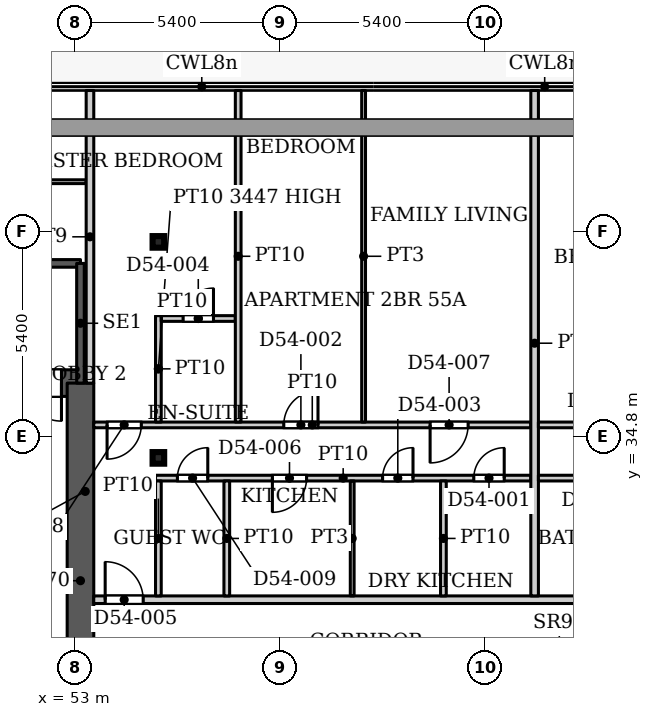
"""IFC4 building model, lengths in metres.
Left out: names, types, materials, properties, quantities, classifications, styles, units other than length and angle.
Written with IfcOpenShell. Run it as: python <this file> out.ifc"""

import sys

from ifc_helpers import new_model, si_unit, direction, frame, frame_2d, origin, origin_2d, place, context, subcontext, project, spatial, rectangle, hollow_rectangle, extrude, source, transform, mapped, element, fill, save


model = new_model("IFC4")
c1 = context("Model", 3, precision=1e-05, world=origin(), true_north=direction((0.0, 1.0)))
c2 = subcontext(c1, "Body", "Model", "MODEL_VIEW")
j1 = project(units=[si_unit("LENGTHUNIT", "METRE"), si_unit("PLANEANGLEUNIT", "RADIAN")], contexts=[c1])
p1 = place(None, origin())
s1 = spatial("IfcSite", under=j1, at=p1, CompositionType="ELEMENT")
p2 = place(p1, origin())
s2 = spatial("IfcBuilding", under=s1, at=p2, CompositionType="ELEMENT")
p3 = place(p2, frame((0.0, 0.0, 235.7)))
s3 = spatial("IfcBuildingStorey", under=s2, at=p3, CompositionType="ELEMENT", Elevation=235.7)
for number, where, z_axis, x_axis in (
    (1, (55.2, 34.232, 0.0), (0.0, 0.0, 1.0), (1.0, 0.0, 0.0)),
    (2, (55.2, 39.916, 0.0), (0.0, 0.0, 1.0), (1.0, 0.0, 0.0)),
):
    element("IfcColumn", number, at=place(p3, frame(where, z_axis=z_axis, x_axis=x_axis)), inside=s3, PredefinedType="COLUMN", context=c2, shape_type="SweptSolid", body=[
        extrude(hollow_rectangle(XDim=0.305, YDim=0.305, WallThickness=0.016, InnerFilletRadius=0.016, OuterFilletRadius=0.032, at=origin_2d()), origin(), (0.0, 0.0, 1.0), 3.9),
    ])
p4 = place(p3, frame((34.75, 36.2, 0.0), z_axis=(0.0, 0.0, 1.0), x_axis=(1.0, 0.0, 0.0)))
e3 = element("IfcWall", 3, at=p4, inside=s3, PredefinedType="SHEAR", context=c2, shape_type="SweptSolid", body=[
    extrude(rectangle(XDim=18.4, YDim=0.7, at=frame_2d((9.2, 0.0))), origin(), (0.0, 0.0, 1.0), 3.9),
])
p5 = place(p4, frame((16.9, 0.0, 0.0)))
e4 = element("IfcOpeningElement", 4, at=p5, cuts=e3, PredefinedType="OPENING", context=c2, shape_type="SweptSolid", body=[
    extrude(rectangle(XDim=1.0, YDim=2.2, at=frame_2d((0.5, 1.1))), frame((0.0, 0.36, 0.0), z_axis=(0.0, -1.0, 0.0), x_axis=(1.0, 0.0, 0.0)), (0.0, 0.0, 1.0), 0.72),
])
p6 = place(p3, frame((53.15, 25.8, 0.0), z_axis=(0.0, 0.0, 1.0), x_axis=(0.0, 1.0, 0.0)))
e5 = element("IfcWall", 5, at=p6, inside=s3, PredefinedType="SHEAR", context=c2, shape_type="SweptSolid", body=[
    extrude(rectangle(XDim=10.4, YDim=0.7, at=frame_2d((5.2, 0.0))), origin(), (0.0, 0.0, 1.0), 3.9),
])
p7 = place(p3, frame((43.99, 39.35, 0.0), z_axis=(0.0, 0.0, 1.0), x_axis=(1.0, 0.0, 0.0)))
e6 = element("IfcWall", 6, at=p7, inside=s3, PredefinedType="SHEAR", context=c2, shape_type="SweptSolid", body=[
    extrude(rectangle(XDim=9.16, YDim=0.2, at=frame_2d((4.58, 0.0))), origin(), (0.0, 0.0, 1.0), 3.9),
])
p8 = place(p3, frame((53.15, 36.2, 0.0), z_axis=(0.0, 0.0, 1.0), x_axis=(0.0, 1.0, 0.0)))
e7 = element("IfcWall", 7, at=p8, inside=s3, PredefinedType="SHEAR", context=c2, shape_type="SweptSolid", body=[
    extrude(rectangle(XDim=3.15, YDim=0.2, at=frame_2d((1.575, 0.0))), origin(), (0.0, 0.0, 1.0), 3.9),
])
p9 = place(p3, frame((38.349, 41.5, 0.0), z_axis=(0.0, 0.0, 1.0), x_axis=(1.0, 0.0, 0.0)))
e8 = element("IfcWall", 8, at=p9, inside=s3, PredefinedType="PARTITIONING", context=c2, shape_type="SweptSolid", body=[
    extrude(rectangle(XDim=14.951, YDim=0.1, at=frame_2d((7.476, 0.0))), origin(), (0.0, 0.0, 1.0), 3.6),
])
p10 = place(p9, frame((6.851, 0.0, 0.0)))
e9 = element("IfcOpeningElement", 9, at=p10, cuts=e8, PredefinedType="OPENING", context=c2, shape_type="SweptSolid", body=[
    extrude(rectangle(XDim=1.0, YDim=2.1, at=frame_2d((0.5, 1.05))), frame((0.0, 0.06, 0.0), z_axis=(0.0, -1.0, 0.0), x_axis=(1.0, 0.0, 0.0)), (0.0, 0.0, 1.0), 0.12),
])
p11 = place(p3, frame((53.4, 36.199, 0.0), z_axis=(0.0, 0.0, 1.0), x_axis=(0.0, 1.0, 0.0)))
e10 = element("IfcWall", 10, at=p11, inside=s3, PredefinedType="PARTITIONING", context=c2, shape_type="SweptSolid", body=[
    extrude(rectangle(XDim=7.701, YDim=0.2, at=frame_2d((3.851, 0.0))), origin(), (0.0, 0.0, 1.0), 3.6),
])
p12 = place(p3, frame((53.499, 30.5, 0.0), z_axis=(0.0, 0.0, 1.0), x_axis=(1.0, 0.0, 0.0)))
e11 = element("IfcWall", 11, at=p12, inside=s3, PredefinedType="PARTITIONING", context=c2, shape_type="SweptSolid", body=[
    extrude(rectangle(XDim=28.401, YDim=0.2, at=frame_2d((14.2, 0.0))), origin(), (0.0, 0.0, 1.0), 3.6),
])
p13 = place(p12, frame((0.301, 0.0, 0.0)))
e12 = element("IfcOpeningElement", 12, at=p13, cuts=e11, PredefinedType="OPENING", context=c2, shape_type="SweptSolid", body=[
    extrude(rectangle(XDim=1.0, YDim=2.1, at=frame_2d((0.5, 1.05))), frame((0.0, 0.11, 0.0), z_axis=(0.0, -1.0, 0.0), x_axis=(1.0, 0.0, 0.0)), (0.0, 0.0, 1.0), 0.22),
])
p14 = place(p12, frame((18.151, 0.0, 0.0)))
e13 = element("IfcOpeningElement", 13, at=p14, cuts=e11, PredefinedType="OPENING", context=c2, shape_type="SweptSolid", body=[
    extrude(rectangle(XDim=1.0, YDim=2.1, at=frame_2d((0.5, 1.05))), frame((0.0, 0.11, 0.0), z_axis=(0.0, -1.0, 0.0), x_axis=(1.0, 0.0, 0.0)), (0.0, 0.0, 1.0), 0.22),
])
p15 = place(p12, frame((25.801, 0.0, 0.0)))
e14 = element("IfcOpeningElement", 14, at=p15, cuts=e11, PredefinedType="OPENING", context=c2, shape_type="SweptSolid", body=[
    extrude(rectangle(XDim=1.0, YDim=2.1, at=frame_2d((0.5, 1.05))), frame((0.0, 0.11, 0.0), z_axis=(0.0, -1.0, 0.0), x_axis=(1.0, 0.0, 0.0)), (0.0, 0.0, 1.0), 0.22),
])
p16 = place(p3, frame((53.499, 35.1, 0.0), z_axis=(0.0, 0.0, 1.0), x_axis=(1.0, 0.0, 0.0)))
e15 = element("IfcWall", 15, at=p16, inside=s3, PredefinedType="PARTITIONING", context=c2, shape_type="SweptSolid", body=[
    extrude(rectangle(XDim=11.501, YDim=0.15, at=frame_2d((5.75, 0.0))), origin(), (0.0, 0.0, 1.0), 3.6),
])
p17 = place(p16, frame((5.001, 0.0, 0.0)))
e16 = element("IfcOpeningElement", 16, at=p17, cuts=e15, PredefinedType="OPENING", context=c2, shape_type="SweptSolid", body=[
    extrude(rectangle(XDim=0.9, YDim=2.1, at=frame_2d((0.45, 1.05))), frame((0.0, 0.085, 0.0), z_axis=(0.0, -1.0, 0.0), x_axis=(1.0, 0.0, 0.0)), (0.0, 0.0, 1.0), 0.17),
])
p18 = place(p16, frame((8.851, 0.0, 0.0)))
e17 = element("IfcOpeningElement", 17, at=p18, cuts=e15, PredefinedType="OPENING", context=c2, shape_type="SweptSolid", body=[
    extrude(rectangle(XDim=1.0, YDim=2.1, at=frame_2d((0.5, 1.05))), frame((0.0, 0.085, 0.0), z_axis=(0.0, -1.0, 0.0), x_axis=(1.0, 0.0, 0.0)), (0.0, 0.0, 1.0), 0.17),
])
p19 = place(p16, frame((0.351, 0.0, 0.0)))
e18 = element("IfcOpeningElement", 18, at=p19, cuts=e15, PredefinedType="OPENING", context=c2, shape_type="SweptSolid", body=[
    extrude(rectangle(XDim=0.9, YDim=2.1, at=frame_2d((0.45, 1.05))), frame((0.0, 0.085, 0.0), z_axis=(0.0, -1.0, 0.0), x_axis=(1.0, 0.0, 0.0)), (0.0, 0.0, 1.0), 0.17),
])
p20 = place(p3, frame((55.125, 33.7, 0.0), z_axis=(0.0, 0.0, 1.0), x_axis=(1.0, 0.0, 0.0)))
e19 = element("IfcWall", 19, at=p20, inside=s3, PredefinedType="PARTITIONING", context=c2, shape_type="SweptSolid", body=[
    extrude(rectangle(XDim=9.875, YDim=0.15, at=frame_2d((4.938, 0.0))), origin(), (0.0, 0.0, 1.0), 3.6),
])
p21 = place(p20, frame((8.375, 0.0, 0.0)))
e20 = element("IfcOpeningElement", 20, at=p21, cuts=e19, PredefinedType="OPENING", context=c2, shape_type="SweptSolid", body=[
    extrude(rectangle(XDim=0.8, YDim=2.1, at=frame_2d((0.4, 1.05))), frame((0.0, 0.085, 0.0), z_axis=(0.0, -1.0, 0.0), x_axis=(1.0, 0.0, 0.0)), (0.0, 0.0, 1.0), 0.17),
])
p22 = place(p20, frame((5.975, 0.0, 0.0)))
e21 = element("IfcOpeningElement", 21, at=p22, cuts=e19, PredefinedType="OPENING", context=c2, shape_type="SweptSolid", body=[
    extrude(rectangle(XDim=0.8, YDim=2.1, at=frame_2d((0.4, 1.05))), frame((0.0, 0.085, 0.0), z_axis=(0.0, -1.0, 0.0), x_axis=(1.0, 0.0, 0.0)), (0.0, 0.0, 1.0), 0.17),
])
p23 = place(p20, frame((3.075, 0.0, 0.0)))
e22 = element("IfcOpeningElement", 22, at=p23, cuts=e19, PredefinedType="OPENING", context=c2, shape_type="SweptSolid", body=[
    extrude(rectangle(XDim=0.9, YDim=2.1, at=frame_2d((0.45, 1.05))), frame((0.0, 0.085, 0.0), z_axis=(0.0, -1.0, 0.0), x_axis=(1.0, 0.0, 0.0)), (0.0, 0.0, 1.0), 0.17),
])
p24 = place(p20, frame((0.575, 0.0, 0.0)))
e23 = element("IfcOpeningElement", 23, at=p24, cuts=e19, PredefinedType="OPENING", context=c2, shape_type="SweptSolid", body=[
    extrude(rectangle(XDim=0.8, YDim=2.1, at=frame_2d((0.4, 1.05))), frame((0.0, 0.085, 0.0), z_axis=(0.0, -1.0, 0.0), x_axis=(1.0, 0.0, 0.0)), (0.0, 0.0, 1.0), 0.17),
])
p25 = place(p3, frame((55.2, 30.6, 0.0), z_axis=(0.0, 0.0, 1.0), x_axis=(0.0, 1.0, 0.0)))
e24 = element("IfcWall", 24, at=p25, inside=s3, PredefinedType="PARTITIONING", context=c2, shape_type="SweptSolid", body=[
    extrude(rectangle(XDim=3.025, YDim=0.15, at=frame_2d((1.512, 0.0))), origin(), (0.0, 0.0, 1.0), 3.6),
])
p26 = place(p3, frame((55.2, 35.175, 0.0), z_axis=(0.0, 0.0, 1.0), x_axis=(0.0, 1.0, 0.0)))
e25 = element("IfcWall", 25, at=p26, inside=s3, PredefinedType="PARTITIONING", context=c2, shape_type="SweptSolid", body=[
    extrude(rectangle(XDim=2.8, YDim=0.15, at=frame_2d((1.4, 0.0))), origin(), (0.0, 0.0, 1.0), 3.447),
])
p27 = place(p3, frame((55.275, 37.9, 0.0), z_axis=(0.0, 0.0, 1.0), x_axis=(1.0, 0.0, 0.0)))
e26 = element("IfcWall", 26, at=p27, inside=s3, PredefinedType="PARTITIONING", context=c2, shape_type="SweptSolid", body=[
    extrude(rectangle(XDim=1.95, YDim=0.15, at=frame_2d((0.975, 0.0))), origin(), (0.0, 0.0, 1.0), 3.6),
])
p28 = place(p27, frame((0.575, 0.0, 0.0)))
e27 = element("IfcOpeningElement", 27, at=p28, cuts=e26, PredefinedType="OPENING", context=c2, shape_type="SweptSolid", body=[
    extrude(rectangle(XDim=0.8, YDim=2.1, at=frame_2d((0.4, 1.05))), frame((0.0, 0.085, 0.0), z_axis=(0.0, -1.0, 0.0), x_axis=(1.0, 0.0, 0.0)), (0.0, 0.0, 1.0), 0.17),
])
p29 = place(p3, frame((57.0, 30.6, 0.0), z_axis=(0.0, 0.0, 1.0), x_axis=(0.0, 1.0, 0.0)))
e28 = element("IfcWall", 28, at=p29, inside=s3, PredefinedType="PARTITIONING", context=c2, shape_type="SweptSolid", body=[
    extrude(rectangle(XDim=3.025, YDim=0.15, at=frame_2d((1.512, 0.0))), origin(), (0.0, 0.0, 1.0), 3.6),
])
p30 = place(p3, frame((57.3, 35.175, 0.0), z_axis=(0.0, 0.0, 1.0), x_axis=(0.0, 1.0, 0.0)))
e29 = element("IfcWall", 29, at=p30, inside=s3, PredefinedType="PARTITIONING", context=c2, shape_type="SweptSolid", body=[
    extrude(rectangle(XDim=8.725, YDim=0.15, at=frame_2d((4.362, 0.0))), origin(), (0.0, 0.0, 1.0), 3.6),
])
p31 = place(p3, frame((60.3, 30.6, 0.0), z_axis=(0.0, 0.0, 1.0), x_axis=(0.0, 1.0, 0.0)))
e30 = element("IfcWall", 30, at=p31, inside=s3, PredefinedType="PARTITIONING", context=c2, shape_type="SweptSolid", body=[
    extrude(rectangle(XDim=3.025, YDim=0.1, at=frame_2d((1.512, 0.0))), origin(), (0.0, 0.0, 1.0), 3.6),
])
p32 = place(p3, frame((60.6, 35.175, 0.0), z_axis=(0.0, 0.0, 1.0), x_axis=(0.0, 1.0, 0.0)))
e31 = element("IfcWall", 31, at=p32, inside=s3, PredefinedType="PARTITIONING", context=c2, shape_type="SweptSolid", body=[
    extrude(rectangle(XDim=8.725, YDim=0.1, at=frame_2d((4.362, 0.0))), origin(), (0.0, 0.0, 1.0), 3.6),
])
p33 = place(p3, frame((62.7, 30.6, 0.0), z_axis=(0.0, 0.0, 1.0), x_axis=(0.0, 1.0, 0.0)))
e32 = element("IfcWall", 32, at=p33, inside=s3, PredefinedType="PARTITIONING", context=c2, shape_type="SweptSolid", body=[
    extrude(rectangle(XDim=3.025, YDim=0.15, at=frame_2d((1.512, 0.0))), origin(), (0.0, 0.0, 1.0), 3.6),
])
p34 = place(p3, frame((65.1, 30.6, 0.0), z_axis=(0.0, 0.0, 1.0), x_axis=(0.0, 1.0, 0.0)))
e33 = element("IfcWall", 33, at=p34, inside=s3, PredefinedType="PARTITIONING", context=c2, shape_type="SweptSolid", body=[
    extrude(rectangle(XDim=13.3, YDim=0.2, at=frame_2d((6.65, 0.0))), origin(), (0.0, 0.0, 1.0), 3.6),
])
p35 = place(p3, frame((65.2, 33.7, 0.0), z_axis=(0.0, 0.0, 1.0), x_axis=(1.0, 0.0, 0.0)))
e34 = element("IfcWall", 34, at=p35, inside=s3, PredefinedType="PARTITIONING", context=c2, shape_type="SweptSolid", body=[
    extrude(rectangle(XDim=5.975, YDim=0.15, at=frame_2d((2.988, 0.0))), origin(), (0.0, 0.0, 1.0), 3.6),
])
p36 = place(p35, frame((4.3, 0.0, 0.0)))
e35 = element("IfcOpeningElement", 35, at=p36, cuts=e34, PredefinedType="OPENING", context=c2, shape_type="SweptSolid", body=[
    extrude(rectangle(XDim=0.8, YDim=2.1, at=frame_2d((0.4, 1.05))), frame((0.0, 0.085, 0.0), z_axis=(0.0, -1.0, 0.0), x_axis=(1.0, 0.0, 0.0)), (0.0, 0.0, 1.0), 0.17),
])
p37 = place(p35, frame((1.25, 0.0, 0.0)))
e36 = element("IfcOpeningElement", 36, at=p37, cuts=e34, PredefinedType="OPENING", context=c2, shape_type="SweptSolid", body=[
    extrude(rectangle(XDim=0.9, YDim=2.1, at=frame_2d((0.45, 1.05))), frame((0.0, 0.085, 0.0), z_axis=(0.0, -1.0, 0.0), x_axis=(1.0, 0.0, 0.0)), (0.0, 0.0, 1.0), 0.17),
])
p38 = place(p3, frame((65.2, 35.1, 0.0), z_axis=(0.0, 0.0, 1.0), x_axis=(1.0, 0.0, 0.0)))
e37 = element("IfcWall", 37, at=p38, inside=s3, PredefinedType="PARTITIONING", context=c2, shape_type="SweptSolid", body=[
    extrude(rectangle(XDim=9.7, YDim=0.15, at=frame_2d((4.85, 0.0))), origin(), (0.0, 0.0, 1.0), 3.6),
])
p39 = place(p38, frame((1.4, 0.0, 0.0)))
e38 = element("IfcOpeningElement", 38, at=p39, cuts=e37, PredefinedType="OPENING", context=c2, shape_type="SweptSolid", body=[
    extrude(rectangle(XDim=0.9, YDim=2.1, at=frame_2d((0.45, 1.05))), frame((0.0, 0.085, 0.0), z_axis=(0.0, -1.0, 0.0), x_axis=(1.0, 0.0, 0.0)), (0.0, 0.0, 1.0), 0.17),
])
p40 = place(p38, frame((6.3, 0.0, 0.0)))
e39 = element("IfcOpeningElement", 39, at=p40, cuts=e37, PredefinedType="OPENING", context=c2, shape_type="SweptSolid", body=[
    extrude(rectangle(XDim=1.0, YDim=2.1, at=frame_2d((0.5, 1.05))), frame((0.0, 0.085, 0.0), z_axis=(0.0, -1.0, 0.0), x_axis=(1.0, 0.0, 0.0)), (0.0, 0.0, 1.0), 0.17),
])
m1 = source(origin(), c2, "Body", "SweptSolid", [
    extrude(rectangle(XDim=1.0, YDim=2.2, at=frame_2d((0.5, 1.1))), frame((0.0, 0.025, 0.0), z_axis=(0.0, -1.0, 0.0), x_axis=(1.0, 0.0, 0.0)), (0.0, 0.0, 1.0), 0.05),
])
p41 = place(p5, origin())
e40 = element("IfcDoor", 40, at=p41, inside=s3, OperationType="SINGLE_SWING_RIGHT", PredefinedType="DOOR", context=c2, shape_type="MappedRepresentation", body=[
    mapped(m1, transform((0.0, 0.0, 0.0), x_axis=(1.0, 0.0, 0.0), y_axis=(0.0, 1.0, 0.0), z_axis=(0.0, 0.0, 1.0), scale=1.0)),
])
fill(e4, e40)
m2 = source(origin(), c2, "Body", "SweptSolid", [
    extrude(rectangle(XDim=0.8, YDim=2.1, at=frame_2d((0.4, 1.05))), frame((0.0, 0.025, 0.0), z_axis=(0.0, -1.0, 0.0), x_axis=(1.0, 0.0, 0.0)), (0.0, 0.0, 1.0), 0.05),
])
p42 = place(p21, origin())
e41 = element("IfcDoor", 41, at=p42, inside=s3, OperationType="SINGLE_SWING_LEFT", PredefinedType="DOOR", context=c2, shape_type="MappedRepresentation", body=[
    mapped(m2, transform((0.0, 0.0, 0.0), x_axis=(1.0, 0.0, 0.0), y_axis=(0.0, 1.0, 0.0), z_axis=(0.0, 0.0, 1.0), scale=1.0)),
])
fill(e20, e41)
m3 = source(origin(), c2, "Body", "SweptSolid", [
    extrude(rectangle(XDim=0.9, YDim=2.1, at=frame_2d((0.45, 1.05))), frame((0.0, 0.025, 0.0), z_axis=(0.0, -1.0, 0.0), x_axis=(1.0, 0.0, 0.0)), (0.0, 0.0, 1.0), 0.05),
])
p43 = place(p17, origin())
e42 = element("IfcDoor", 42, at=p43, inside=s3, OperationType="SINGLE_SWING_LEFT", PredefinedType="DOOR", context=c2, shape_type="MappedRepresentation", body=[
    mapped(m3, transform((0.0, 0.0, 0.0), x_axis=(1.0, 0.0, 0.0), y_axis=(0.0, 1.0, 0.0), z_axis=(0.0, 0.0, 1.0), scale=1.0)),
])
fill(e16, e42)
p44 = place(p22, origin())
e43 = element("IfcDoor", 43, at=p44, inside=s3, OperationType="SINGLE_SWING_LEFT", PredefinedType="DOOR", context=c2, shape_type="MappedRepresentation", body=[
    mapped(m2, transform((0.0, 0.0, 0.0), x_axis=(1.0, 0.0, 0.0), y_axis=(0.0, 1.0, 0.0), z_axis=(0.0, 0.0, 1.0), scale=1.0)),
])
fill(e21, e43)
p45 = place(p28, origin())
e44 = element("IfcDoor", 44, at=p45, inside=s3, OperationType="SINGLE_SWING_LEFT", PredefinedType="DOOR", context=c2, shape_type="MappedRepresentation", body=[
    mapped(m2, transform((0.0, 0.0, 0.0), x_axis=(1.0, 0.0, 0.0), y_axis=(0.0, 1.0, 0.0), z_axis=(0.0, 0.0, 1.0), scale=1.0)),
])
fill(e27, e44)
m4 = source(origin(), c2, "Body", "SweptSolid", [
    extrude(rectangle(XDim=1.0, YDim=2.1, at=frame_2d((0.5, 1.05))), frame((0.0, 0.025, 0.0), z_axis=(0.0, -1.0, 0.0), x_axis=(1.0, 0.0, 0.0)), (0.0, 0.0, 1.0), 0.05),
])
p46 = place(p13, origin())
e45 = element("IfcDoor", 45, at=p46, inside=s3, OperationType="SINGLE_SWING_LEFT", PredefinedType="DOOR", context=c2, shape_type="MappedRepresentation", body=[
    mapped(m4, transform((0.0, 0.0, 0.0), x_axis=(1.0, 0.0, 0.0), y_axis=(0.0, 1.0, 0.0), z_axis=(0.0, 0.0, 1.0), scale=1.0)),
])
fill(e12, e45)
p47 = place(p23, origin())
e46 = element("IfcDoor", 46, at=p47, inside=s3, OperationType="SINGLE_SWING_RIGHT", PredefinedType="DOOR", context=c2, shape_type="MappedRepresentation", body=[
    mapped(m3, transform((0.0, 0.0, 0.0), x_axis=(1.0, 0.0, 0.0), y_axis=(0.0, 1.0, 0.0), z_axis=(0.0, 0.0, 1.0), scale=1.0)),
])
fill(e22, e46)
m5 = source(origin(), c2, "Body", "SweptSolid", [
    extrude(rectangle(XDim=1.0, YDim=2.1, at=frame_2d((0.5, 1.05))), frame((0.0, 0.025, 0.0), z_axis=(0.0, -1.0, 0.0), x_axis=(1.0, 0.0, 0.0)), (0.0, 0.0, 1.0), 0.05),
])
p48 = place(p18, origin())
e47 = element("IfcDoor", 47, at=p48, inside=s3, OperationType="SINGLE_SWING_RIGHT", PredefinedType="DOOR", context=c2, shape_type="MappedRepresentation", body=[
    mapped(m5, transform((0.0, 0.0, 0.0), x_axis=(1.0, 0.0, 0.0), y_axis=(0.0, 1.0, 0.0), z_axis=(0.0, 0.0, 1.0), scale=1.0)),
])
fill(e17, e47)
p49 = place(p19, origin())
e48 = element("IfcDoor", 48, at=p49, inside=s3, OperationType="SINGLE_SWING_RIGHT", PredefinedType="DOOR", context=c2, shape_type="MappedRepresentation", body=[
    mapped(m3, transform((0.0, 0.0, 0.0), x_axis=(1.0, 0.0, 0.0), y_axis=(0.0, 1.0, 0.0), z_axis=(0.0, 0.0, 1.0), scale=1.0)),
])
fill(e18, e48)
p50 = place(p24, origin())
e49 = element("IfcDoor", 49, at=p50, inside=s3, OperationType="SINGLE_SWING_LEFT", PredefinedType="DOOR", context=c2, shape_type="MappedRepresentation", body=[
    mapped(m2, transform((0.0, 0.0, 0.0), x_axis=(1.0, 0.0, 0.0), y_axis=(0.0, 1.0, 0.0), z_axis=(0.0, 0.0, 1.0), scale=1.0)),
])
fill(e23, e49)
save(model, sys.argv[1])
